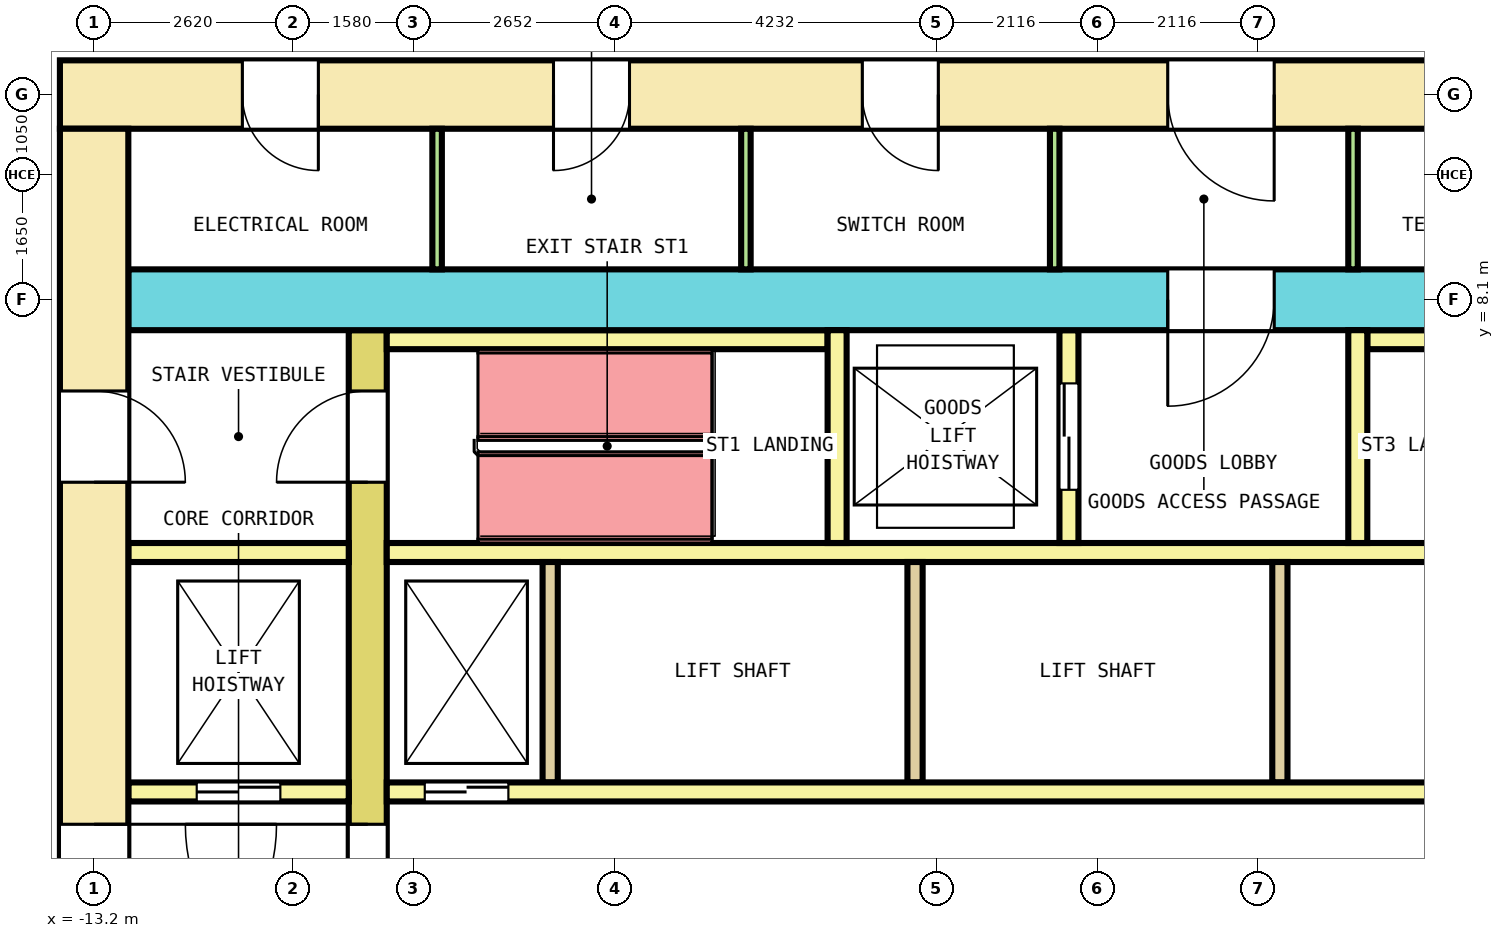
"""IFC4 building model, lengths in metres.
Left out: names, types, materials, properties, quantities, classifications, styles, units other than length and angle.
Written with IfcOpenShell. Run it as: python <this file> out.ifc"""

import sys

from ifc_helpers import new_model, si_unit, direction, frame, frame_2d, origin, place, context, subcontext, project, spatial, rectangle, extrude, element, fill, save


model = new_model("IFC4")
c1 = context("Model", 3, precision=1e-05, world=origin(), true_north=direction((0.0, 1.0)))
c2 = subcontext(c1, "Body", "Model", "MODEL_VIEW")
j1 = project(units=[si_unit("LENGTHUNIT", "METRE"), si_unit("PLANEANGLEUNIT", "RADIAN")], contexts=[c1])
p1 = place(None, origin())
s1 = spatial("IfcSite", under=j1, at=p1, CompositionType="ELEMENT")
p2 = place(p1, origin())
s2 = spatial("IfcBuilding", under=s1, at=p2, CompositionType="ELEMENT")
p3 = place(p2, frame((0.0, 0.0, 41.0)))
s3 = spatial("IfcBuildingStorey", under=s2, at=p3, CompositionType="ELEMENT", Elevation=41.0)
p4 = place(p3, frame((-13.65, 10.8, 0.0), z_axis=(0.0, 0.0, 1.0), x_axis=(1.0, 0.0, 0.0)))
e1 = element("IfcWall", 1, at=p4, inside=s3, PredefinedType="SHEAR", context=c2, shape_type="SweptSolid", body=[
    extrude(rectangle(XDim=27.3, YDim=0.9, at=frame_2d((13.65, 0.0))), origin(), (0.0, 0.0, 1.0), 4.1),
])
p5 = place(p4, frame((2.4, 0.0, 0.0)))
e2 = element("IfcOpeningElement", 2, at=p5, cuts=e1, PredefinedType="OPENING", context=c2, shape_type="SweptSolid", body=[
    extrude(rectangle(XDim=1.0, YDim=2.1, at=frame_2d((0.5, 1.05))), frame((0.0, 0.46, 0.0), z_axis=(0.0, -1.0, 0.0), x_axis=(1.0, 0.0, 0.0)), (0.0, 0.0, 1.0), 0.92),
])
p6 = place(p4, frame((6.494, 0.0, 0.0)))
e3 = element("IfcOpeningElement", 3, at=p6, cuts=e1, PredefinedType="OPENING", context=c2, shape_type="SweptSolid", body=[
    extrude(rectangle(XDim=1.0, YDim=2.1, at=frame_2d((0.5, 1.05))), frame((0.0, 0.46, 0.0), z_axis=(0.0, -1.0, 0.0), x_axis=(1.0, 0.0, 0.0)), (0.0, 0.0, 1.0), 0.92),
])
p7 = place(p4, frame((10.556, 0.0, 0.0)))
e4 = element("IfcOpeningElement", 4, at=p7, cuts=e1, PredefinedType="OPENING", context=c2, shape_type="SweptSolid", body=[
    extrude(rectangle(XDim=1.0, YDim=2.1, at=frame_2d((0.5, 1.05))), frame((0.0, 0.46, 0.0), z_axis=(0.0, -1.0, 0.0), x_axis=(1.0, 0.0, 0.0)), (0.0, 0.0, 1.0), 0.92),
])
p8 = place(p4, frame((18.077, 0.0, 0.0)))
e5 = element("IfcOpeningElement", 5, at=p8, cuts=e1, PredefinedType="OPENING", context=c2, shape_type="SweptSolid", body=[
    extrude(rectangle(XDim=1.0, YDim=2.1, at=frame_2d((0.5, 1.05))), frame((0.0, 0.46, 0.0), z_axis=(0.0, -1.0, 0.0), x_axis=(1.0, 0.0, 0.0)), (0.0, 0.0, 1.0), 0.92),
])
p9 = place(p4, frame((21.206, 0.0, 0.0)))
e6 = element("IfcOpeningElement", 6, at=p9, cuts=e1, PredefinedType="OPENING", context=c2, shape_type="SweptSolid", body=[
    extrude(rectangle(XDim=1.0, YDim=2.1, at=frame_2d((0.5, 1.05))), frame((0.0, 0.46, 0.0), z_axis=(0.0, -1.0, 0.0), x_axis=(1.0, 0.0, 0.0)), (0.0, 0.0, 1.0), 0.92),
])
p10 = place(p4, frame((24.367, 0.0, 0.0)))
e7 = element("IfcOpeningElement", 7, at=p10, cuts=e1, PredefinedType="OPENING", context=c2, shape_type="SweptSolid", body=[
    extrude(rectangle(XDim=1.0, YDim=2.1, at=frame_2d((0.5, 1.05))), frame((0.0, 0.46, 0.0), z_axis=(0.0, -1.0, 0.0), x_axis=(1.0, 0.0, 0.0)), (0.0, 0.0, 1.0), 0.92),
])
p11 = place(p4, frame((14.575, 0.0, 0.0)))
e8 = element("IfcOpeningElement", 8, at=p11, cuts=e1, PredefinedType="OPENING", context=c2, shape_type="SweptSolid", body=[
    extrude(rectangle(XDim=1.4, YDim=2.1, at=frame_2d((0.7, 1.05))), frame((0.0, 0.46, 0.0), z_axis=(0.0, -1.0, 0.0), x_axis=(1.0, 0.0, 0.0)), (0.0, 0.0, 1.0), 0.92),
])
p12 = place(p3, frame((-13.2, -10.35, 0.0), z_axis=(0.0, 0.0, 1.0), x_axis=(0.0, 1.0, 0.0)))
e9 = element("IfcWall", 9, at=p12, inside=s3, PredefinedType="SHEAR", context=c2, shape_type="SweptSolid", body=[
    extrude(rectangle(XDim=20.7, YDim=0.9, at=frame_2d((10.35, 0.0))), origin(), (0.0, 0.0, 1.0), 4.1),
])
p13 = place(p12, frame((9.15, 0.0, 0.0)))
e10 = element("IfcOpeningElement", 10, at=p13, cuts=e9, PredefinedType="OPENING", context=c2, shape_type="SweptSolid", body=[
    extrude(rectangle(XDim=2.4, YDim=2.1, at=frame_2d((1.2, 1.05))), frame((0.0, 0.46, 0.0), z_axis=(0.0, -1.0, 0.0), x_axis=(1.0, 0.0, 0.0)), (0.0, 0.0, 1.0), 0.92),
])
p14 = place(p12, frame((16.05, 0.0, 0.0)))
e11 = element("IfcOpeningElement", 11, at=p14, cuts=e9, PredefinedType="OPENING", context=c2, shape_type="SweptSolid", body=[
    extrude(rectangle(XDim=1.2, YDim=2.1, at=frame_2d((0.6, 1.05))), frame((0.0, 0.46, 0.0), z_axis=(0.0, -1.0, 0.0), x_axis=(1.0, 0.0, 0.0)), (0.0, 0.0, 1.0), 0.92),
])
p15 = place(p12, frame((3.45, 0.0, 0.0)))
e12 = element("IfcOpeningElement", 12, at=p15, cuts=e9, PredefinedType="OPENING", context=c2, shape_type="SweptSolid", body=[
    extrude(rectangle(XDim=1.2, YDim=2.1, at=frame_2d((0.6, 1.05))), frame((0.0, 0.46, 0.0), z_axis=(0.0, -1.0, 0.0), x_axis=(1.0, 0.0, 0.0)), (0.0, 0.0, 1.0), 0.92),
])
p16 = place(p3, frame((-12.75, 8.1, 0.0), z_axis=(0.0, 0.0, 1.0), x_axis=(1.0, 0.0, 0.0)))
e13 = element("IfcWall", 13, at=p16, inside=s3, PredefinedType="SHEAR", context=c2, shape_type="SweptSolid", body=[
    extrude(rectangle(XDim=25.5, YDim=0.8, at=frame_2d((12.75, 0.0))), origin(), (0.0, 0.0, 1.0), 4.1),
])
p17 = place(p16, frame((13.675, 0.0, 0.0)))
e14 = element("IfcOpeningElement", 14, at=p17, cuts=e13, PredefinedType="OPENING", context=c2, shape_type="SweptSolid", body=[
    extrude(rectangle(XDim=1.4, YDim=2.1, at=frame_2d((0.7, 1.05))), frame((0.0, 0.41, 0.0), z_axis=(0.0, -1.0, 0.0), x_axis=(1.0, 0.0, 0.0)), (0.0, 0.0, 1.0), 0.82),
])
p18 = place(p3, frame((-9.6, -7.7, 0.0), z_axis=(0.0, 0.0, 1.0), x_axis=(0.0, 1.0, 0.0)))
e15 = element("IfcWall", 15, at=p18, inside=s3, PredefinedType="SHEAR", context=c2, shape_type="SweptSolid", body=[
    extrude(rectangle(XDim=15.4, YDim=0.5, at=frame_2d((7.7, 0.0))), origin(), (0.0, 0.0, 1.0), 4.1),
])
p19 = place(p18, frame((6.5, 0.0, 0.0)))
e16 = element("IfcOpeningElement", 16, at=p19, cuts=e15, PredefinedType="OPENING", context=c2, shape_type="SweptSolid", body=[
    extrude(rectangle(XDim=2.4, YDim=2.1, at=frame_2d((1.2, 1.05))), frame((0.0, 0.26, 0.0), z_axis=(0.0, -1.0, 0.0), x_axis=(1.0, 0.0, 0.0)), (0.0, 0.0, 1.0), 0.52),
])
p20 = place(p18, frame((13.4, 0.0, 0.0)))
e17 = element("IfcOpeningElement", 17, at=p20, cuts=e15, PredefinedType="OPENING", context=c2, shape_type="SweptSolid", body=[
    extrude(rectangle(XDim=1.2, YDim=2.1, at=frame_2d((0.6, 1.05))), frame((0.0, 0.26, 0.0), z_axis=(0.0, -1.0, 0.0), x_axis=(1.0, 0.0, 0.0)), (0.0, 0.0, 1.0), 0.52),
])
p21 = place(p18, frame((0.8, 0.0, 0.0)))
e18 = element("IfcOpeningElement", 18, at=p21, cuts=e15, PredefinedType="OPENING", context=c2, shape_type="SweptSolid", body=[
    extrude(rectangle(XDim=1.2, YDim=2.1, at=frame_2d((0.6, 1.05))), frame((0.0, 0.26, 0.0), z_axis=(0.0, -1.0, 0.0), x_axis=(1.0, 0.0, 0.0)), (0.0, 0.0, 1.0), 0.52),
])
p22 = place(p3, frame((-12.75, 1.625, 0.0), z_axis=(0.0, 0.0, 1.0), x_axis=(1.0, 0.0, 0.0)))
e19 = element("IfcWall", 19, at=p22, inside=s3, PredefinedType="SOLIDWALL", context=c2, shape_type="SweptSolid", body=[
    extrude(rectangle(XDim=2.9, YDim=0.25, at=frame_2d((1.45, 0.0))), origin(), (0.0, 0.0, 1.0), 4.1),
])
p23 = place(p22, frame((0.9, 0.0, 0.0)))
e20 = element("IfcOpeningElement", 20, at=p23, cuts=e19, PredefinedType="OPENING", context=c2, shape_type="SweptSolid", body=[
    extrude(rectangle(XDim=1.1, YDim=2.1, at=frame_2d((0.55, 1.05))), frame((0.0, 0.135, 0.0), z_axis=(0.0, -1.0, 0.0), x_axis=(1.0, 0.0, 0.0)), (0.0, 0.0, 1.0), 0.27),
])
p24 = place(p3, frame((-9.35, 1.625, 0.0), z_axis=(0.0, 0.0, 1.0), x_axis=(1.0, 0.0, 0.0)))
e21 = element("IfcWall", 21, at=p24, inside=s3, PredefinedType="SOLIDWALL", context=c2, shape_type="SweptSolid", body=[
    extrude(rectangle(XDim=18.7, YDim=0.25, at=frame_2d((9.35, 0.0))), origin(), (0.0, 0.0, 1.0), 4.1),
])
p25 = place(p24, frame((0.5, 0.0, 0.0)))
e22 = element("IfcOpeningElement", 22, at=p25, cuts=e21, PredefinedType="OPENING", context=c2, shape_type="SweptSolid", body=[
    extrude(rectangle(XDim=1.1, YDim=2.1, at=frame_2d((0.55, 1.05))), frame((0.0, 0.135, 0.0), z_axis=(0.0, -1.0, 0.0), x_axis=(1.0, 0.0, 0.0)), (0.0, 0.0, 1.0), 0.27),
])
p26 = place(p24, frame((17.1, 0.0, 0.0)))
e23 = element("IfcOpeningElement", 23, at=p26, cuts=e21, PredefinedType="OPENING", context=c2, shape_type="SweptSolid", body=[
    extrude(rectangle(XDim=1.1, YDim=2.1, at=frame_2d((0.55, 1.05))), frame((0.0, 0.135, 0.0), z_axis=(0.0, -1.0, 0.0), x_axis=(1.0, 0.0, 0.0)), (0.0, 0.0, 1.0), 0.27),
])
p27 = place(p3, frame((-12.75, 4.775, 0.0), z_axis=(0.0, 0.0, 1.0), x_axis=(1.0, 0.0, 0.0)))
e24 = element("IfcWall", 24, at=p27, inside=s3, PredefinedType="SOLIDWALL", context=c2, shape_type="SweptSolid", body=[
    extrude(rectangle(XDim=2.9, YDim=0.25, at=frame_2d((1.45, 0.0))), origin(), (0.0, 0.0, 1.0), 4.1),
])
p28 = place(p3, frame((-9.35, 4.775, 0.0), z_axis=(0.0, 0.0, 1.0), x_axis=(1.0, 0.0, 0.0)))
e25 = element("IfcWall", 25, at=p28, inside=s3, PredefinedType="SOLIDWALL", context=c2, shape_type="SweptSolid", body=[
    extrude(rectangle(XDim=18.7, YDim=0.25, at=frame_2d((9.35, 0.0))), origin(), (0.0, 0.0, 1.0), 4.1),
])
for number, where, z_axis, x_axis in (
    (26, (-7.2, 1.75, 0.0), (0.0, 0.0, 1.0), (0.0, 1.0, 0.0)),
    (27, (-2.4, 1.75, 0.0), (0.0, 0.0, 1.0), (0.0, 1.0, 0.0)),
    (28, (2.4, 1.75, 0.0), (0.0, 0.0, 1.0), (0.0, 1.0, 0.0)),
):
    element("IfcWall", number, at=place(p3, frame(where, z_axis=z_axis, x_axis=x_axis)), inside=s3, PredefinedType="SOLIDWALL", context=c2, shape_type="SweptSolid", body=[
        extrude(rectangle(XDim=2.9, YDim=0.2, at=frame_2d((1.45, 0.0))), origin(), (0.0, 0.0, 1.0), 4.1),
    ])
for number, where, z_axis, x_axis in (
    (29, (-9.35, 7.575, 0.0), (0.0, 0.0, 1.0), (1.0, 0.0, 0.0)),
    (30, (3.55, 7.575, 0.0), (0.0, 0.0, 1.0), (1.0, 0.0, 0.0)),
):
    element("IfcWall", number, at=place(p3, frame(where, z_axis=z_axis, x_axis=x_axis)), inside=s3, PredefinedType="SOLIDWALL", context=c2, shape_type="SweptSolid", body=[
        extrude(rectangle(XDim=5.8, YDim=0.25, at=frame_2d((2.9, 0.0))), origin(), (0.0, 0.0, 1.0), 4.1),
    ])
p29 = place(p3, frame((-3.425, 4.9, 0.0), z_axis=(0.0, 0.0, 1.0), x_axis=(0.0, 1.0, 0.0)))
e31 = element("IfcWall", 31, at=p29, inside=s3, PredefinedType="SOLIDWALL", context=c2, shape_type="SweptSolid", body=[
    extrude(rectangle(XDim=2.8, YDim=0.25, at=frame_2d((1.4, 0.0))), origin(), (0.0, 0.0, 1.0), 4.1),
])
p30 = place(p3, frame((-0.375, 4.9, 0.0), z_axis=(0.0, 0.0, 1.0), x_axis=(0.0, 1.0, 0.0)))
e32 = element("IfcWall", 32, at=p30, inside=s3, PredefinedType="SOLIDWALL", context=c2, shape_type="SweptSolid", body=[
    extrude(rectangle(XDim=2.8, YDim=0.25, at=frame_2d((1.4, 0.0))), origin(), (0.0, 0.0, 1.0), 4.1),
])
p31 = place(p30, frame((0.7, 0.0, 0.0)))
e33 = element("IfcOpeningElement", 33, at=p31, cuts=e32, PredefinedType="OPENING", context=c2, shape_type="SweptSolid", body=[
    extrude(rectangle(XDim=1.4, YDim=2.1, at=frame_2d((0.7, 1.05))), frame((0.0, 0.135, 0.0), z_axis=(0.0, -1.0, 0.0), x_axis=(1.0, 0.0, 0.0)), (0.0, 0.0, 1.0), 0.27),
])
p32 = place(p3, frame((3.425, 4.9, 0.0), z_axis=(0.0, 0.0, 1.0), x_axis=(0.0, 1.0, 0.0)))
e34 = element("IfcWall", 34, at=p32, inside=s3, PredefinedType="SOLIDWALL", context=c2, shape_type="SweptSolid", body=[
    extrude(rectangle(XDim=2.8, YDim=0.25, at=frame_2d((1.4, 0.0))), origin(), (0.0, 0.0, 1.0), 4.1),
])
for number, where, z_axis, x_axis in (
    (35, (-8.688, 8.5, 0.0), (0.0, 0.0, 1.0), (0.0, 1.0, 0.0)),
    (36, (-4.625, 8.5, 0.0), (0.0, 0.0, 1.0), (0.0, 1.0, 0.0)),
    (37, (-0.562, 8.5, 0.0), (0.0, 0.0, 1.0), (0.0, 1.0, 0.0)),
    (38, (3.363, 8.5, 0.0), (0.0, 0.0, 1.0), (0.0, 1.0, 0.0)),
):
    element("IfcWall", number, at=place(p3, frame(where, z_axis=z_axis, x_axis=x_axis)), inside=s3, PredefinedType="PARTITIONING", context=c2, shape_type="SweptSolid", body=[
        extrude(rectangle(XDim=1.85, YDim=0.125, at=frame_2d((0.925, 0.0))), origin(), (0.0, 0.0, 1.0), 4.1),
    ])
p33 = place(p23, origin())
e39 = element("IfcDoor", 39, at=p33, inside=s3, OperationType="DOUBLE_DOOR_SLIDING", PredefinedType="DOOR", context=c2, shape_type="SweptSolid", body=[
    extrude(rectangle(XDim=1.1, YDim=2.1, at=frame_2d((0.55, 1.05))), frame((0.0, 0.075, 0.0), z_axis=(0.0, -1.0, 0.0), x_axis=(1.0, 0.0, 0.0)), (0.0, 0.0, 1.0), 0.15),
])
fill(e20, e39)
p34 = place(p25, origin())
e40 = element("IfcDoor", 40, at=p34, inside=s3, OperationType="DOUBLE_DOOR_SLIDING", PredefinedType="DOOR", context=c2, shape_type="SweptSolid", body=[
    extrude(rectangle(XDim=1.1, YDim=2.1, at=frame_2d((0.55, 1.05))), frame((0.0, 0.075, 0.0), z_axis=(0.0, -1.0, 0.0), x_axis=(1.0, 0.0, 0.0)), (0.0, 0.0, 1.0), 0.15),
])
fill(e22, e40)
p35 = place(p31, origin())
e41 = element("IfcDoor", 41, at=p35, inside=s3, OperationType="DOUBLE_DOOR_SLIDING", PredefinedType="DOOR", context=c2, shape_type="SweptSolid", body=[
    extrude(rectangle(XDim=1.4, YDim=2.1, at=frame_2d((0.7, 1.05))), frame((0.0, 0.075, 0.0), z_axis=(0.0, -1.0, 0.0), x_axis=(1.0, 0.0, 0.0)), (0.0, 0.0, 1.0), 0.15),
])
fill(e33, e41)
p36 = place(p19, origin())
e42 = element("IfcDoor", 42, at=p36, inside=s3, OperationType="DOUBLE_DOOR_SINGLE_SWING", PredefinedType="DOOR", context=c2, shape_type="SweptSolid", body=[
    extrude(rectangle(XDim=2.4, YDim=2.1, at=frame_2d((1.2, 1.05))), frame((0.0, 0.2, 0.0), z_axis=(0.0, -1.0, 0.0), x_axis=(1.0, 0.0, 0.0)), (0.0, 0.0, 1.0), 0.4),
])
fill(e16, e42)
p37 = place(p13, origin())
e43 = element("IfcDoor", 43, at=p37, inside=s3, OperationType="DOUBLE_DOOR_SINGLE_SWING", PredefinedType="DOOR", context=c2, shape_type="SweptSolid", body=[
    extrude(rectangle(XDim=2.4, YDim=2.1, at=frame_2d((1.2, 1.05))), frame((0.0, 0.3, 0.0), z_axis=(0.0, -1.0, 0.0), x_axis=(1.0, 0.0, 0.0)), (0.0, 0.0, 1.0), 0.6),
])
fill(e10, e43)
p38 = place(p20, origin())
e44 = element("IfcDoor", 44, at=p38, inside=s3, OperationType="SINGLE_SWING_RIGHT", PredefinedType="DOOR", context=c2, shape_type="SweptSolid", body=[
    extrude(rectangle(XDim=1.2, YDim=2.1, at=frame_2d((0.6, 1.05))), frame((0.0, 0.2, 0.0), z_axis=(0.0, -1.0, 0.0), x_axis=(1.0, 0.0, 0.0)), (0.0, 0.0, 1.0), 0.4),
])
fill(e17, e44)
p39 = place(p14, origin())
e45 = element("IfcDoor", 45, at=p39, inside=s3, OperationType="SINGLE_SWING_LEFT", PredefinedType="DOOR", context=c2, shape_type="SweptSolid", body=[
    extrude(rectangle(XDim=1.2, YDim=2.1, at=frame_2d((0.6, 1.05))), frame((0.0, 0.3, 0.0), z_axis=(0.0, -1.0, 0.0), x_axis=(1.0, 0.0, 0.0)), (0.0, 0.0, 1.0), 0.6),
])
fill(e11, e45)
p40 = place(p17, origin())
e46 = element("IfcDoor", 46, at=p40, inside=s3, OperationType="DOUBLE_DOOR_SINGLE_SWING", PredefinedType="DOOR", context=c2, shape_type="SweptSolid", body=[
    extrude(rectangle(XDim=1.4, YDim=2.1, at=frame_2d((0.7, 1.05))), frame((0.0, 0.3, 0.0), z_axis=(0.0, -1.0, 0.0), x_axis=(1.0, 0.0, 0.0)), (0.0, 0.0, 1.0), 0.6),
])
fill(e14, e46)
p41 = place(p5, origin())
e47 = element("IfcDoor", 47, at=p41, inside=s3, OperationType="SINGLE_SWING_RIGHT", PredefinedType="DOOR", context=c2, shape_type="SweptSolid", body=[
    extrude(rectangle(XDim=1.0, YDim=2.1, at=frame_2d((0.5, 1.05))), frame((0.0, 0.3, 0.0), z_axis=(0.0, -1.0, 0.0), x_axis=(1.0, 0.0, 0.0)), (0.0, 0.0, 1.0), 0.6),
])
fill(e2, e47)
p42 = place(p6, origin())
e48 = element("IfcDoor", 48, at=p42, inside=s3, OperationType="SINGLE_SWING_LEFT", PredefinedType="DOOR", context=c2, shape_type="SweptSolid", body=[
    extrude(rectangle(XDim=1.0, YDim=2.1, at=frame_2d((0.5, 1.05))), frame((0.0, 0.3, 0.0), z_axis=(0.0, -1.0, 0.0), x_axis=(1.0, 0.0, 0.0)), (0.0, 0.0, 1.0), 0.6),
])
fill(e3, e48)
p43 = place(p7, origin())
e49 = element("IfcDoor", 49, at=p43, inside=s3, OperationType="SINGLE_SWING_RIGHT", PredefinedType="DOOR", context=c2, shape_type="SweptSolid", body=[
    extrude(rectangle(XDim=1.0, YDim=2.1, at=frame_2d((0.5, 1.05))), frame((0.0, 0.3, 0.0), z_axis=(0.0, -1.0, 0.0), x_axis=(1.0, 0.0, 0.0)), (0.0, 0.0, 1.0), 0.6),
])
fill(e4, e49)
p44 = place(p11, origin())
e50 = element("IfcDoor", 50, at=p44, inside=s3, OperationType="DOUBLE_DOOR_SINGLE_SWING", PredefinedType="DOOR", context=c2, shape_type="SweptSolid", body=[
    extrude(rectangle(XDim=1.4, YDim=2.1, at=frame_2d((0.7, 1.05))), frame((0.0, 0.3, 0.0), z_axis=(0.0, -1.0, 0.0), x_axis=(1.0, 0.0, 0.0)), (0.0, 0.0, 1.0), 0.6),
])
fill(e8, e50)
save(model, sys.argv[1])
